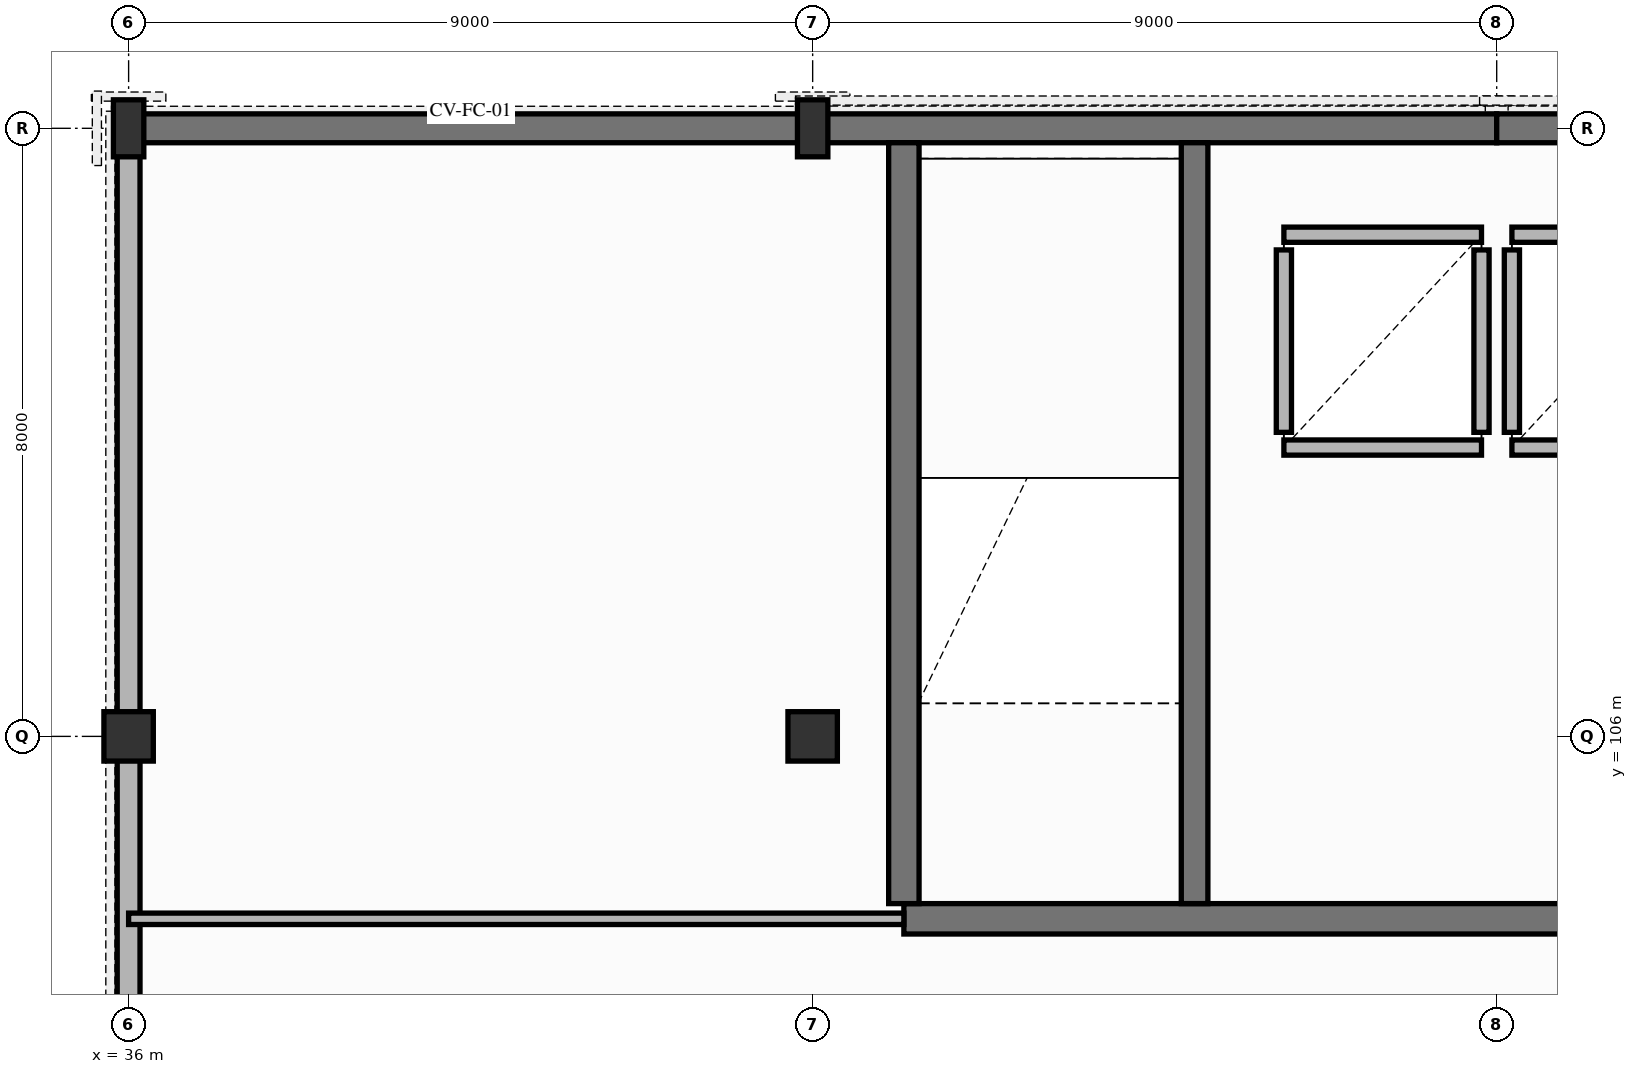
"""IFC4 building model, lengths in metres.
Left out: names, types, materials, properties, quantities, classifications, styles, units other than length and angle.
Written with IfcOpenShell. Run it as: python <this file> out.ifc"""

import sys

from ifc_helpers import new_model, si_unit, direction, frame, frame_2d, origin, origin_2d, place, context, subcontext, project, spatial, rectangle, extrude, element, fill, save


model = new_model("IFC4")
c1 = context("Model", 3, precision=1e-05, world=origin(), true_north=direction((0.0, 1.0)))
c2 = subcontext(c1, "Body", "Model", "MODEL_VIEW")
j1 = project(units=[si_unit("LENGTHUNIT", "METRE"), si_unit("PLANEANGLEUNIT", "RADIAN")], contexts=[c1])
p1 = place(None, origin())
s1 = spatial("IfcSite", under=j1, at=p1, CompositionType="ELEMENT")
p2 = place(p1, origin())
s2 = spatial("IfcBuilding", under=s1, at=p2, CompositionType="ELEMENT")
p3 = place(p2, frame((0.0, 0.0, 16.52)))
s3 = spatial("IfcBuildingStorey", under=s2, at=p3, CompositionType="ELEMENT", Elevation=16.52)
p4 = place(p3, frame((36.0, 106.0, 0.0), z_axis=(0.0, 0.0, 1.0), x_axis=(1.0, 0.0, 0.0)))
e1 = element("IfcColumn", 1, at=p4, inside=s3, PredefinedType="COLUMN", context=c2, shape_type="SweptSolid", body=[
    extrude(rectangle(XDim=0.65, YDim=0.65, at=origin_2d()), origin(), (0.0, 0.0, 1.0), 3.74),
])
p5 = place(p3, frame((36.0, 114.0, 0.0), z_axis=(0.0, 0.0, 1.0), x_axis=(0.0, 1.0, 0.0)))
e2 = element("IfcColumn", 2, at=p5, inside=s3, PredefinedType="COLUMN", context=c2, shape_type="SweptSolid", body=[
    extrude(rectangle(XDim=0.4, YDim=0.75, at=origin_2d()), origin(), (0.0, 0.0, 1.0), 3.74),
])
p6 = place(p3, frame((45.0, 106.0, 0.0), z_axis=(0.0, 0.0, 1.0), x_axis=(1.0, 0.0, 0.0)))
e3 = element("IfcColumn", 3, at=p6, inside=s3, PredefinedType="COLUMN", context=c2, shape_type="SweptSolid", body=[
    extrude(rectangle(XDim=0.65, YDim=0.65, at=origin_2d()), origin(), (0.0, 0.0, 1.0), 3.74),
])
p7 = place(p3, frame((45.0, 114.0, 0.0), z_axis=(0.0, 0.0, 1.0), x_axis=(0.0, 1.0, 0.0)))
e4 = element("IfcColumn", 4, at=p7, inside=s3, PredefinedType="COLUMN", context=c2, shape_type="SweptSolid", body=[
    extrude(rectangle(XDim=0.4, YDim=0.75, at=origin_2d()), origin(), (0.0, 0.0, 1.0), 3.74),
])
p8 = place(p3, frame((36.0, 114.0, 0.0), z_axis=(0.0, 0.0, 1.0), x_axis=(1.0, 0.0, 0.0)))
e5 = element("IfcWall", 5, at=p8, inside=s3, PredefinedType="SOLIDWALL", context=c2, shape_type="SweptSolid", body=[
    extrude(rectangle(XDim=9.0, YDim=0.38, at=frame_2d((4.5, 0.0))), origin(), (0.0, 0.0, 1.0), 3.46),
])
p9 = place(p8, frame((2.4, 0.0, 0.845)))
e6 = element("IfcOpeningElement", 6, at=p9, cuts=e5, PredefinedType="OPENING", context=c2, shape_type="SweptSolid", body=[
    extrude(rectangle(XDim=2.0, YDim=1.9, at=frame_2d((1.0, 0.95))), frame((0.0, 0.2, 0.0), z_axis=(0.0, -1.0, 0.0), x_axis=(1.0, 0.0, 0.0)), (0.0, 0.0, 1.0), 0.4),
])
for number, where, z_axis, x_axis in (
    (7, (45.0, 114.0, 0.0), (0.0, 0.0, 1.0), (1.0, 0.0, 0.0)),
    (8, (54.0, 114.0, 0.0), (0.0, 0.0, 1.0), (1.0, 0.0, 0.0)),
):
    element("IfcWall", number, at=place(p3, frame(where, z_axis=z_axis, x_axis=x_axis)), inside=s3, PredefinedType="SOLIDWALL", context=c2, shape_type="SweptSolid", body=[
        extrude(rectangle(XDim=9.0, YDim=0.38, at=frame_2d((4.5, 0.0))), origin(), (0.0, 0.0, 1.0), 3.46),
    ])
p10 = place(p3, frame((36.0, 90.0, 0.0), z_axis=(0.0, 0.0, 1.0), x_axis=(0.0, 1.0, 0.0)))
e9 = element("IfcWall", 9, at=p10, inside=s3, PredefinedType="SOLIDWALL", context=c2, shape_type="SweptSolid", body=[
    extrude(rectangle(XDim=24.0, YDim=0.3, at=frame_2d((12.0, 0.0))), origin(), (0.0, 0.0, 1.0), 2.785),
])
p11 = place(p10, frame((3.0, 0.0, 0.815)))
e10 = element("IfcOpeningElement", 10, at=p11, cuts=e9, PredefinedType="OPENING", context=c2, shape_type="SweptSolid", body=[
    extrude(rectangle(XDim=1.35, YDim=1.85, at=frame_2d((0.675, 0.925))), frame((0.0, 0.16, 0.0), z_axis=(0.0, -1.0, 0.0), x_axis=(1.0, 0.0, 0.0)), (0.0, 0.0, 1.0), 0.32),
])
p12 = place(p10, frame((11.7, 0.0, 0.915)))
e11 = element("IfcOpeningElement", 11, at=p12, cuts=e9, PredefinedType="OPENING", context=c2, shape_type="SweptSolid", body=[
    extrude(rectangle(XDim=1.05, YDim=1.75, at=frame_2d((0.525, 0.875))), frame((0.0, 0.16, 0.0), z_axis=(0.0, -1.0, 0.0), x_axis=(1.0, 0.0, 0.0)), (0.0, 0.0, 1.0), 0.32),
])
p13 = place(p10, frame((16.5, 0.0, 0.565)))
e12 = element("IfcOpeningElement", 12, at=p13, cuts=e9, PredefinedType="OPENING", context=c2, shape_type="SweptSolid", body=[
    extrude(rectangle(XDim=1.5, YDim=2.1, at=frame_2d((0.75, 1.05))), frame((0.0, 0.16, 0.0), z_axis=(0.0, -1.0, 0.0), x_axis=(1.0, 0.0, 0.0)), (0.0, 0.0, 1.0), 0.32),
])
p14 = place(p3, frame((46.2, 103.6, 0.0), z_axis=(0.0, 0.0, 1.0), x_axis=(1.0, 0.0, 0.0)))
e13 = element("IfcWall", 13, at=p14, inside=s3, PredefinedType="SHEAR", context=c2, shape_type="SweptSolid", body=[
    extrude(rectangle(XDim=13.2, YDim=0.4, at=frame_2d((6.6, 0.0))), origin(), (0.0, 0.0, 1.0), 3.46),
])
p15 = place(p14, frame((5.8, 0.0, 0.0)))
e14 = element("IfcOpeningElement", 14, at=p15, cuts=e13, PredefinedType="OPENING", context=c2, shape_type="SweptSolid", body=[
    extrude(rectangle(XDim=1.5, YDim=2.2, at=frame_2d((0.75, 1.1))), frame((0.0, 0.21, 0.0), z_axis=(0.0, -1.0, 0.0), x_axis=(1.0, 0.0, 0.0)), (0.0, 0.0, 1.0), 0.42),
])
p16 = place(p3, frame((46.2, 103.8, 0.0), z_axis=(0.0, 0.0, 1.0), x_axis=(0.0, 1.0, 0.0)))
e15 = element("IfcWall", 15, at=p16, inside=s3, PredefinedType="SHEAR", context=c2, shape_type="SweptSolid", body=[
    extrude(rectangle(XDim=10.01, YDim=0.4, at=frame_2d((5.005, 0.0))), origin(), (0.0, 0.0, 1.0), 3.46),
])
p17 = place(p3, frame((50.025, 103.8, 0.0), z_axis=(0.0, 0.0, 1.0), x_axis=(0.0, 1.0, 0.0)))
e16 = element("IfcWall", 16, at=p17, inside=s3, PredefinedType="SHEAR", context=c2, shape_type="SweptSolid", body=[
    extrude(rectangle(XDim=10.01, YDim=0.35, at=frame_2d((5.005, 0.0))), origin(), (0.0, 0.0, 1.0), 3.46),
])
p18 = place(p17, frame((0.45, 0.0, 0.0)))
e17 = element("IfcOpeningElement", 17, at=p18, cuts=e16, PredefinedType="OPENING", context=c2, shape_type="SweptSolid", body=[
    extrude(rectangle(XDim=1.05, YDim=2.2, at=frame_2d((0.525, 1.1))), frame((0.0, 0.185, 0.0), z_axis=(0.0, -1.0, 0.0), x_axis=(1.0, 0.0, 0.0)), (0.0, 0.0, 1.0), 0.37),
])
p19 = place(p3, frame((51.2, 109.8, 0.0), z_axis=(0.0, 0.0, 1.0), x_axis=(1.0, 0.0, 0.0)))
e18 = element("IfcWall", 18, at=p19, inside=s3, PredefinedType="PARTITIONING", context=c2, shape_type="SweptSolid", body=[
    extrude(rectangle(XDim=2.6, YDim=0.2, at=frame_2d((1.3, 0.0))), origin(), (0.0, 0.0, 1.0), 3.46),
])
p20 = place(p19, frame((0.75, 0.0, 0.0)))
e19 = element("IfcOpeningElement", 19, at=p20, cuts=e18, PredefinedType="OPENING", context=c2, shape_type="SweptSolid", body=[
    extrude(rectangle(XDim=1.1, YDim=2.15, at=frame_2d((0.55, 1.075))), frame((0.0, 0.11, 0.0), z_axis=(0.0, -1.0, 0.0), x_axis=(1.0, 0.0, 0.0)), (0.0, 0.0, 1.0), 0.22),
])
p21 = place(p3, frame((51.2, 112.6, 0.0), z_axis=(0.0, 0.0, 1.0), x_axis=(1.0, 0.0, 0.0)))
e20 = element("IfcWall", 20, at=p21, inside=s3, PredefinedType="PARTITIONING", context=c2, shape_type="SweptSolid", body=[
    extrude(rectangle(XDim=2.6, YDim=0.2, at=frame_2d((1.3, 0.0))), origin(), (0.0, 0.0, 1.0), 3.46),
])
for number, where, z_axis, x_axis in (
    (21, (51.2, 110.0, 0.0), (0.0, 0.0, 1.0), (0.0, 1.0, 0.0)),
    (22, (53.8, 110.0, 0.0), (0.0, 0.0, 1.0), (0.0, 1.0, 0.0)),
):
    element("IfcWall", number, at=place(p3, frame(where, z_axis=z_axis, x_axis=x_axis)), inside=s3, PredefinedType="PARTITIONING", context=c2, shape_type="SweptSolid", body=[
        extrude(rectangle(XDim=2.4, YDim=0.2, at=frame_2d((1.2, 0.0))), origin(), (0.0, 0.0, 1.0), 3.46),
    ])
p22 = place(p3, frame((54.2, 109.8, 0.0), z_axis=(0.0, 0.0, 1.0), x_axis=(1.0, 0.0, 0.0)))
e23 = element("IfcWall", 23, at=p22, inside=s3, PredefinedType="PARTITIONING", context=c2, shape_type="SweptSolid", body=[
    extrude(rectangle(XDim=2.6, YDim=0.2, at=frame_2d((1.3, 0.0))), origin(), (0.0, 0.0, 1.0), 3.46),
])
p23 = place(p22, frame((0.75, 0.0, 0.0)))
e24 = element("IfcOpeningElement", 24, at=p23, cuts=e23, PredefinedType="OPENING", context=c2, shape_type="SweptSolid", body=[
    extrude(rectangle(XDim=1.1, YDim=2.15, at=frame_2d((0.55, 1.075))), frame((0.0, 0.11, 0.0), z_axis=(0.0, -1.0, 0.0), x_axis=(1.0, 0.0, 0.0)), (0.0, 0.0, 1.0), 0.22),
])
p24 = place(p3, frame((54.2, 112.6, 0.0), z_axis=(0.0, 0.0, 1.0), x_axis=(1.0, 0.0, 0.0)))
e25 = element("IfcWall", 25, at=p24, inside=s3, PredefinedType="PARTITIONING", context=c2, shape_type="SweptSolid", body=[
    extrude(rectangle(XDim=2.6, YDim=0.2, at=frame_2d((1.3, 0.0))), origin(), (0.0, 0.0, 1.0), 3.46),
])
p25 = place(p3, frame((54.2, 110.0, 0.0), z_axis=(0.0, 0.0, 1.0), x_axis=(0.0, 1.0, 0.0)))
e26 = element("IfcWall", 26, at=p25, inside=s3, PredefinedType="PARTITIONING", context=c2, shape_type="SweptSolid", body=[
    extrude(rectangle(XDim=2.4, YDim=0.2, at=frame_2d((1.2, 0.0))), origin(), (0.0, 0.0, 1.0), 3.46),
])
p26 = place(p3, frame((36.0, 103.6, 0.0), z_axis=(0.0, 0.0, 1.0), x_axis=(1.0, 0.0, 0.0)))
e27 = element("IfcWall", 27, at=p26, inside=s3, PredefinedType="PARTITIONING", context=c2, shape_type="SweptSolid", body=[
    extrude(rectangle(XDim=10.2, YDim=0.15, at=frame_2d((5.1, 0.0))), origin(), (0.0, 0.0, 1.0), 3.46),
])
p27 = place(p26, frame((4.5, 0.0, 0.0)))
e28 = element("IfcOpeningElement", 28, at=p27, cuts=e27, PredefinedType="OPENING", context=c2, shape_type="SweptSolid", body=[
    extrude(rectangle(XDim=1.0, YDim=2.15, at=frame_2d((0.5, 1.075))), frame((0.0, 0.085, 0.0), z_axis=(0.0, -1.0, 0.0), x_axis=(1.0, 0.0, 0.0)), (0.0, 0.0, 1.0), 0.17),
])
p28 = place(p9, origin())
e29 = element("IfcWindow", 29, at=p28, inside=s3, PartitioningType="SINGLE_PANEL", PredefinedType="WINDOW", context=c2, shape_type="SweptSolid", body=[
    extrude(rectangle(XDim=2.0, YDim=1.9, at=frame_2d((1.0, 0.95))), frame((0.0, 0.03, 0.0), z_axis=(0.0, -1.0, 0.0), x_axis=(1.0, 0.0, 0.0)), (0.0, 0.0, 1.0), 0.06),
])
fill(e6, e29)
p29 = place(p12, origin())
e30 = element("IfcWindow", 30, at=p29, inside=s3, PartitioningType="SINGLE_PANEL", PredefinedType="WINDOW", context=c2, shape_type="SweptSolid", body=[
    extrude(rectangle(XDim=1.05, YDim=1.75, at=frame_2d((0.525, 0.875))), frame((0.0, 0.03, 0.0), z_axis=(0.0, -1.0, 0.0), x_axis=(1.0, 0.0, 0.0)), (0.0, 0.0, 1.0), 0.06),
])
fill(e11, e30)
p30 = place(p13, origin())
e31 = element("IfcWindow", 31, at=p30, inside=s3, PartitioningType="SINGLE_PANEL", PredefinedType="WINDOW", context=c2, shape_type="SweptSolid", body=[
    extrude(rectangle(XDim=1.5, YDim=2.1, at=frame_2d((0.75, 1.05))), frame((0.0, 0.03, 0.0), z_axis=(0.0, -1.0, 0.0), x_axis=(1.0, 0.0, 0.0)), (0.0, 0.0, 1.0), 0.06),
])
fill(e12, e31)
p31 = place(p15, origin())
e32 = element("IfcDoor", 32, at=p31, inside=s3, OperationType="DOUBLE_DOOR_SINGLE_SWING", PredefinedType="DOOR", context=c2, shape_type="SweptSolid", body=[
    extrude(rectangle(XDim=1.5, YDim=2.2, at=frame_2d((0.75, 1.1))), frame((0.0, 0.025, 0.0), z_axis=(0.0, -1.0, 0.0), x_axis=(1.0, 0.0, 0.0)), (0.0, 0.0, 1.0), 0.05),
])
fill(e14, e32)
p32 = place(p18, origin())
e33 = element("IfcDoor", 33, at=p32, inside=s3, OperationType="SINGLE_SWING_LEFT", PredefinedType="DOOR", context=c2, shape_type="SweptSolid", body=[
    extrude(rectangle(XDim=1.05, YDim=2.2, at=frame_2d((0.525, 1.1))), frame((0.0, 0.025, 0.0), z_axis=(0.0, -1.0, 0.0), x_axis=(1.0, 0.0, 0.0)), (0.0, 0.0, 1.0), 0.05),
])
fill(e17, e33)
p33 = place(p20, origin())
e34 = element("IfcDoor", 34, at=p33, inside=s3, OperationType="SLIDING_TO_LEFT", PredefinedType="DOOR", context=c2, shape_type="SweptSolid", body=[
    extrude(rectangle(XDim=1.1, YDim=2.15, at=frame_2d((0.55, 1.075))), frame((0.0, 0.025, 0.0), z_axis=(0.0, -1.0, 0.0), x_axis=(1.0, 0.0, 0.0)), (0.0, 0.0, 1.0), 0.05),
])
fill(e19, e34)
p34 = place(p27, origin())
e35 = element("IfcDoor", 35, at=p34, inside=s3, OperationType="SINGLE_SWING_RIGHT", PredefinedType="DOOR", context=c2, shape_type="SweptSolid", body=[
    extrude(rectangle(XDim=1.0, YDim=2.15, at=frame_2d((0.5, 1.075))), frame((0.0, 0.025, 0.0), z_axis=(0.0, -1.0, 0.0), x_axis=(1.0, 0.0, 0.0)), (0.0, 0.0, 1.0), 0.05),
])
fill(e28, e35)
save(model, sys.argv[1])
